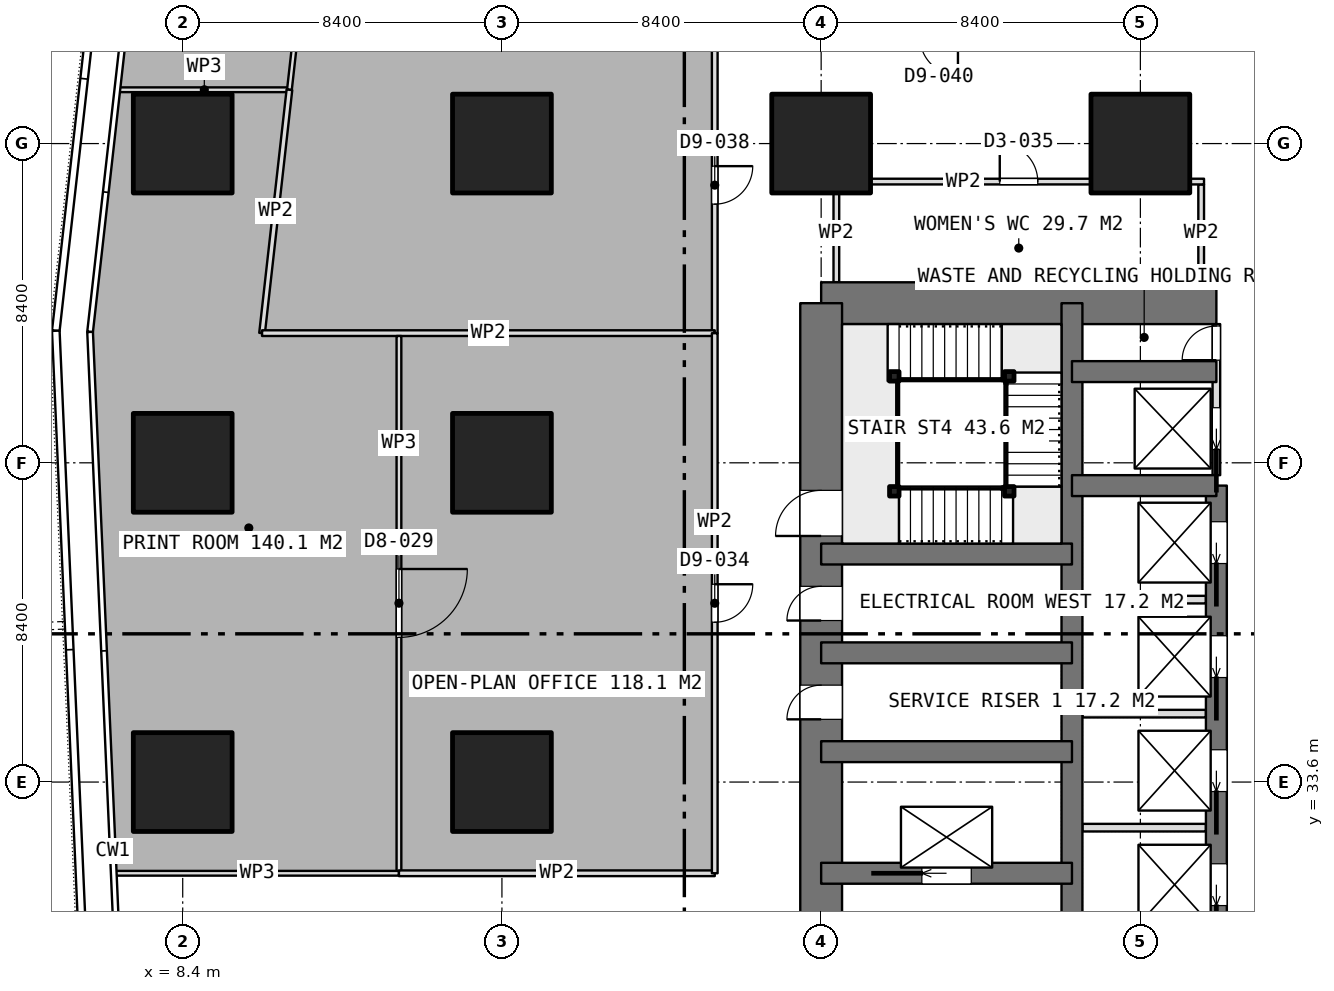
"""IFC4 building model, lengths in metres.
Left out: names, types, materials, properties, quantities, classifications, styles, units other than length and angle.
Written with IfcOpenShell. Run it as: python <this file> out.ifc"""

import sys

from ifc_helpers import new_model, si_unit, direction, frame, frame_2d, origin, origin_2d, place, context, subcontext, project, spatial, rectangle, extrude, element, fill, save


model = new_model("IFC4")
c1 = context("Model", 3, precision=1e-05, world=origin(), true_north=direction((0.0, 1.0)))
c2 = subcontext(c1, "Body", "Model", "MODEL_VIEW")
j1 = project(units=[si_unit("LENGTHUNIT", "METRE"), si_unit("PLANEANGLEUNIT", "RADIAN")], contexts=[c1])
p1 = place(None, origin())
s1 = spatial("IfcSite", under=j1, at=p1, CompositionType="ELEMENT")
p2 = place(p1, origin())
s2 = spatial("IfcBuilding", under=s1, at=p2, CompositionType="ELEMENT")
p3 = place(p2, frame((0.0, 0.0, 29.15)))
s3 = spatial("IfcBuildingStorey", under=s2, at=p3, CompositionType="ELEMENT", Elevation=29.15)
p4 = place(p3, frame((25.2, 46.2, 0.0), z_axis=(0.0, 0.0, 1.0), x_axis=(1.0, 0.0, 0.0)))
e1 = element("IfcWall", 1, at=p4, inside=s3, PredefinedType="SHEAR", context=c2, shape_type="SweptSolid", body=[
    extrude(rectangle(XDim=10.4, YDim=1.1, at=frame_2d((5.2, 0.0))), origin(), (0.0, 0.0, 1.0), 3.75),
])
p5 = place(p3, frame((25.2, 21.0, 0.0), z_axis=(0.0, 0.0, 1.0), x_axis=(0.0, 1.0, 0.0)))
e2 = element("IfcWall", 2, at=p5, inside=s3, PredefinedType="SHEAR", context=c2, shape_type="SweptSolid", body=[
    extrude(rectangle(XDim=25.2, YDim=1.1, at=frame_2d((12.6, 0.0))), origin(), (0.0, 0.0, 1.0), 3.75),
])
p6 = place(p5, frame((7.8, 0.0, 0.0)))
e3 = element("IfcOpeningElement", 3, at=p6, cuts=e2, PredefinedType="OPENING", context=c2, shape_type="SweptSolid", body=[
    extrude(rectangle(XDim=1.2, YDim=2.1, at=frame_2d((0.6, 1.05))), frame((0.0, 0.56, 0.0), z_axis=(0.0, -1.0, 0.0), x_axis=(1.0, 0.0, 0.0)), (0.0, 0.0, 1.0), 1.12),
])
p7 = place(p5, frame((14.25, 0.0, 0.0)))
e4 = element("IfcOpeningElement", 4, at=p7, cuts=e2, PredefinedType="OPENING", context=c2, shape_type="SweptSolid", body=[
    extrude(rectangle(XDim=0.9, YDim=2.1, at=frame_2d((0.45, 1.05))), frame((0.0, 0.56, 0.0), z_axis=(0.0, -1.0, 0.0), x_axis=(1.0, 0.0, 0.0)), (0.0, 0.0, 1.0), 1.12),
])
p8 = place(p5, frame((16.85, 0.0, 0.0)))
e5 = element("IfcOpeningElement", 5, at=p8, cuts=e2, PredefinedType="OPENING", context=c2, shape_type="SweptSolid", body=[
    extrude(rectangle(XDim=0.9, YDim=2.1, at=frame_2d((0.45, 1.05))), frame((0.0, 0.56, 0.0), z_axis=(0.0, -1.0, 0.0), x_axis=(1.0, 0.0, 0.0)), (0.0, 0.0, 1.0), 1.12),
])
p9 = place(p5, frame((19.075, 0.0, 0.0)))
e6 = element("IfcOpeningElement", 6, at=p9, cuts=e2, PredefinedType="OPENING", context=c2, shape_type="SweptSolid", body=[
    extrude(rectangle(XDim=1.2, YDim=2.1, at=frame_2d((0.6, 1.05))), frame((0.0, 0.56, 0.0), z_axis=(0.0, -1.0, 0.0), x_axis=(1.0, 0.0, 0.0)), (0.0, 0.0, 1.0), 1.12),
])
p10 = place(p3, frame((31.8, 21.0, 0.0), z_axis=(0.0, 0.0, 1.0), x_axis=(0.0, 1.0, 0.0)))
e7 = element("IfcWall", 7, at=p10, inside=s3, PredefinedType="SHEAR", context=c2, shape_type="SweptSolid", body=[
    extrude(rectangle(XDim=25.2, YDim=0.55, at=frame_2d((12.6, 0.0))), origin(), (0.0, 0.0, 1.0), 3.75),
])
p11 = place(p3, frame((35.6, 23.4, 0.0), z_axis=(0.0, 0.0, 1.0), x_axis=(0.0, 1.0, 0.0)))
e8 = element("IfcWall", 8, at=p11, inside=s3, PredefinedType="SHEAR", context=c2, shape_type="SweptSolid", body=[
    extrude(rectangle(XDim=18.0, YDim=0.55, at=frame_2d((9.0, 0.0))), origin(), (0.0, 0.0, 1.0), 3.75),
])
p12 = place(p11, frame((0.95, 0.0, 0.0)))
e9 = element("IfcOpeningElement", 9, at=p12, cuts=e8, PredefinedType="OPENING", context=c2, shape_type="SweptSolid", body=[
    extrude(rectangle(XDim=1.1, YDim=2.1, at=frame_2d((0.55, 1.05))), frame((0.0, 0.285, 0.0), z_axis=(0.0, -1.0, 0.0), x_axis=(1.0, 0.0, 0.0)), (0.0, 0.0, 1.0), 0.57),
])
p13 = place(p11, frame((3.95, 0.0, 0.0)))
e10 = element("IfcOpeningElement", 10, at=p13, cuts=e8, PredefinedType="OPENING", context=c2, shape_type="SweptSolid", body=[
    extrude(rectangle(XDim=1.1, YDim=2.1, at=frame_2d((0.55, 1.05))), frame((0.0, 0.285, 0.0), z_axis=(0.0, -1.0, 0.0), x_axis=(1.0, 0.0, 0.0)), (0.0, 0.0, 1.0), 0.57),
])
p14 = place(p11, frame((6.95, 0.0, 0.0)))
e11 = element("IfcOpeningElement", 11, at=p14, cuts=e8, PredefinedType="OPENING", context=c2, shape_type="SweptSolid", body=[
    extrude(rectangle(XDim=1.1, YDim=2.1, at=frame_2d((0.55, 1.05))), frame((0.0, 0.285, 0.0), z_axis=(0.0, -1.0, 0.0), x_axis=(1.0, 0.0, 0.0)), (0.0, 0.0, 1.0), 0.57),
])
p15 = place(p11, frame((9.95, 0.0, 0.0)))
e12 = element("IfcOpeningElement", 12, at=p15, cuts=e8, PredefinedType="OPENING", context=c2, shape_type="SweptSolid", body=[
    extrude(rectangle(XDim=1.1, YDim=2.1, at=frame_2d((0.55, 1.05))), frame((0.0, 0.285, 0.0), z_axis=(0.0, -1.0, 0.0), x_axis=(1.0, 0.0, 0.0)), (0.0, 0.0, 1.0), 0.57),
])
p16 = place(p11, frame((12.95, 0.0, 0.0)))
e13 = element("IfcOpeningElement", 13, at=p16, cuts=e8, PredefinedType="OPENING", context=c2, shape_type="SweptSolid", body=[
    extrude(rectangle(XDim=1.1, YDim=2.1, at=frame_2d((0.55, 1.05))), frame((0.0, 0.285, 0.0), z_axis=(0.0, -1.0, 0.0), x_axis=(1.0, 0.0, 0.0)), (0.0, 0.0, 1.0), 0.57),
])
p17 = place(p11, frame((15.95, 0.0, 0.0)))
e14 = element("IfcOpeningElement", 14, at=p17, cuts=e8, PredefinedType="OPENING", context=c2, shape_type="SweptSolid", body=[
    extrude(rectangle(XDim=1.1, YDim=2.1, at=frame_2d((0.55, 1.05))), frame((0.0, 0.285, 0.0), z_axis=(0.0, -1.0, 0.0), x_axis=(1.0, 0.0, 0.0)), (0.0, 0.0, 1.0), 0.57),
])
for number, where, z_axis, x_axis in (
    (15, (31.8, 41.4, 0.0), (0.0, 0.0, 1.0), (1.0, 0.0, 0.0)),
    (16, (31.8, 44.4, 0.0), (0.0, 0.0, 1.0), (1.0, 0.0, 0.0)),
):
    element("IfcWall", number, at=place(p3, frame(where, z_axis=z_axis, x_axis=x_axis)), inside=s3, PredefinedType="SHEAR", context=c2, shape_type="SweptSolid", body=[
        extrude(rectangle(XDim=3.8, YDim=0.55, at=frame_2d((1.9, 0.0))), origin(), (0.0, 0.0, 1.0), 3.75),
    ])
p18 = place(p3, frame((25.2, 31.2, 0.0), z_axis=(0.0, 0.0, 1.0), x_axis=(1.0, 0.0, 0.0)))
e17 = element("IfcWall", 17, at=p18, inside=s3, PredefinedType="SHEAR", context=c2, shape_type="SweptSolid", body=[
    extrude(rectangle(XDim=6.6, YDim=0.55, at=frame_2d((3.3, 0.0))), origin(), (0.0, 0.0, 1.0), 3.75),
])
p19 = place(p18, frame((2.65, 0.0, 0.0)))
e18 = element("IfcOpeningElement", 18, at=p19, cuts=e17, PredefinedType="OPENING", context=c2, shape_type="SweptSolid", body=[
    extrude(rectangle(XDim=1.3, YDim=2.1, at=frame_2d((0.65, 1.05))), frame((0.0, 0.285, 0.0), z_axis=(0.0, -1.0, 0.0), x_axis=(1.0, 0.0, 0.0)), (0.0, 0.0, 1.0), 0.57),
])
for number, where, z_axis, x_axis in (
    (19, (25.2, 34.4, 0.0), (0.0, 0.0, 1.0), (1.0, 0.0, 0.0)),
    (20, (25.2, 37.0, 0.0), (0.0, 0.0, 1.0), (1.0, 0.0, 0.0)),
    (21, (25.2, 39.6, 0.0), (0.0, 0.0, 1.0), (1.0, 0.0, 0.0)),
):
    element("IfcWall", number, at=place(p3, frame(where, z_axis=z_axis, x_axis=x_axis)), inside=s3, PredefinedType="SHEAR", context=c2, shape_type="SweptSolid", body=[
        extrude(rectangle(XDim=6.6, YDim=0.55, at=frame_2d((3.3, 0.0))), origin(), (0.0, 0.0, 1.0), 3.75),
    ])
for number, where, z_axis, x_axis in (
    (22, (8.4, 33.6, 0.0), (0.0, 0.0, 1.0), (1.0, 0.0, 0.0)),
    (23, (8.4, 42.0, 0.0), (0.0, 0.0, 1.0), (1.0, 0.0, 0.0)),
    (24, (8.4, 50.4, 0.0), (0.0, 0.0, 1.0), (1.0, 0.0, 0.0)),
    (25, (16.8, 33.6, 0.0), (0.0, 0.0, 1.0), (1.0, 0.0, 0.0)),
    (26, (16.8, 42.0, 0.0), (0.0, 0.0, 1.0), (1.0, 0.0, 0.0)),
    (27, (16.8, 50.4, 0.0), (0.0, 0.0, 1.0), (1.0, 0.0, 0.0)),
    (28, (25.2, 50.4, 0.0), (0.0, 0.0, 1.0), (1.0, 0.0, 0.0)),
    (29, (33.6, 50.4, 0.0), (0.0, 0.0, 1.0), (1.0, 0.0, 0.0)),
):
    element("IfcColumn", number, at=place(p3, frame(where, z_axis=z_axis, x_axis=x_axis)), inside=s3, PredefinedType="COLUMN", context=c2, shape_type="SweptSolid", body=[
        extrude(rectangle(XDim=2.6, YDim=2.6, at=origin_2d()), origin(), (0.0, 0.0, 1.0), 3.75),
    ])
for number, where, z_axis, x_axis in (
    (30, (32.075, 32.4, 0.0), (0.0, 0.0, 1.0), (1.0, 0.0, 0.0)),
    (31, (32.075, 35.4, 0.0), (0.0, 0.0, 1.0), (1.0, 0.0, 0.0)),
    (32, (32.075, 38.4, 0.0), (0.0, 0.0, 1.0), (1.0, 0.0, 0.0)),
):
    element("IfcWall", number, at=place(p3, frame(where, z_axis=z_axis, x_axis=x_axis)), inside=s3, PredefinedType="PARTITIONING", context=c2, shape_type="SweptSolid", body=[
        extrude(rectangle(XDim=3.25, YDim=0.2, at=frame_2d((1.625, 0.0))), origin(), (0.0, 0.0, 1.0), 3.5),
    ])
p20 = place(p3, frame((35.6, 41.675, 0.0), z_axis=(0.0, 0.0, 1.0), x_axis=(0.0, 1.0, 0.0)))
e33 = element("IfcWall", 33, at=p20, inside=s3, PredefinedType="PARTITIONING", context=c2, shape_type="SweptSolid", body=[
    extrude(rectangle(XDim=3.975, YDim=0.2, at=frame_2d((1.987, 0.0))), origin(), (0.0, 0.0, 1.0), 3.5),
])
p21 = place(p20, frame((3.025, 0.0, 0.0)))
e34 = element("IfcOpeningElement", 34, at=p21, cuts=e33, PredefinedType="OPENING", context=c2, shape_type="SweptSolid", body=[
    extrude(rectangle(XDim=0.9, YDim=2.1, at=frame_2d((0.45, 1.05))), frame((0.0, 0.11, 0.0), z_axis=(0.0, -1.0, 0.0), x_axis=(1.0, 0.0, 0.0)), (0.0, 0.0, 1.0), 0.22),
])
p22 = place(p20, frame((0.675, 0.0, 0.0)))
e35 = element("IfcOpeningElement", 35, at=p22, cuts=e33, PredefinedType="OPENING", context=c2, shape_type="SweptSolid", body=[
    extrude(rectangle(XDim=1.1, YDim=2.1, at=frame_2d((0.55, 1.05))), frame((0.0, 0.11, 0.0), z_axis=(0.0, -1.0, 0.0), x_axis=(1.0, 0.0, 0.0)), (0.0, 0.0, 1.0), 0.22),
])
p23 = place(p3, frame((25.525, 49.4, 0.0), z_axis=(0.0, 0.0, 1.0), x_axis=(1.0, 0.0, 0.0)))
e36 = element("IfcWall", 36, at=p23, inside=s3, PredefinedType="PARTITIONING", context=c2, shape_type="SweptSolid", body=[
    extrude(rectangle(XDim=9.75, YDim=0.15, at=frame_2d((4.875, 0.0))), origin(), (0.0, 0.0, 1.0), 3.5),
])
p24 = place(p23, frame((4.375, 0.0, 0.0)))
e37 = element("IfcOpeningElement", 37, at=p24, cuts=e36, PredefinedType="OPENING", context=c2, shape_type="SweptSolid", body=[
    extrude(rectangle(XDim=1.0, YDim=2.1, at=frame_2d((0.5, 1.05))), frame((0.0, 0.085, 0.0), z_axis=(0.0, -1.0, 0.0), x_axis=(1.0, 0.0, 0.0)), (0.0, 0.0, 1.0), 0.17),
])
for number, where, z_axis, x_axis in (
    (38, (25.6, 46.75, 0.0), (0.0, 0.0, 1.0), (0.0, 1.0, 0.0)),
    (39, (35.2, 46.75, 0.0), (0.0, 0.0, 1.0), (0.0, 1.0, 0.0)),
):
    element("IfcWall", number, at=place(p3, frame(where, z_axis=z_axis, x_axis=x_axis)), inside=s3, PredefinedType="PARTITIONING", context=c2, shape_type="SweptSolid", body=[
        extrude(rectangle(XDim=2.575, YDim=0.15, at=frame_2d((1.288, 0.0))), origin(), (0.0, 0.0, 1.0), 3.5),
    ])
p25 = place(p3, frame((11.208, 51.816, 0.0), z_axis=(0.0, 0.0, 1.0), x_axis=(-1.0, 0.0, 0.0)))
e40 = element("IfcWall", 40, at=p25, inside=s3, PredefinedType="PARTITIONING", context=c2, shape_type="SweptSolid", body=[
    extrude(rectangle(XDim=4.479, YDim=0.125, at=frame_2d((2.24, 0.0))), origin(), (0.0, 0.0, 1.0), 3.5),
])
p26 = place(p3, frame((11.72, 56.371, 0.0), z_axis=(0.0, 0.0, 1.0), x_axis=(-0.11168826691, -0.993743292322, 0.0)))
e41 = element("IfcWall", 41, at=p26, inside=s3, PredefinedType="PARTITIONING", context=c2, shape_type="SweptSolid", body=[
    extrude(rectangle(XDim=4.584, YDim=0.125, at=frame_2d((2.292, 0.0))), origin(), (0.0, 0.0, 1.0), 3.5),
])
p27 = place(p3, frame((10.488, 45.412, 0.0), z_axis=(0.0, 0.0, 1.0), x_axis=(0.111741452635, 0.993737313259, 0.0)))
e42 = element("IfcWall", 42, at=p27, inside=s3, PredefinedType="PARTITIONING", context=c2, shape_type="SweptSolid", body=[
    extrude(rectangle(XDim=6.443, YDim=0.15, at=frame_2d((3.222, 0.0))), origin(), (0.0, 0.0, 1.0), 3.5),
])
p28 = place(p3, frame((22.4, 53.2, 0.0), z_axis=(0.0, 0.0, 1.0), x_axis=(0.0, -1.0, 0.0)))
e43 = element("IfcWall", 43, at=p28, inside=s3, PredefinedType="PARTITIONING", context=c2, shape_type="SweptSolid", body=[
    extrude(rectangle(XDim=7.788, YDim=0.15, at=frame_2d((3.894, 0.0))), origin(), (0.0, 0.0, 1.0), 3.5),
])
p29 = place(p28, frame((3.394, 0.0, 0.0)))
e44 = element("IfcOpeningElement", 44, at=p29, cuts=e43, PredefinedType="OPENING", context=c2, shape_type="SweptSolid", body=[
    extrude(rectangle(XDim=1.0, YDim=2.1, at=frame_2d((0.5, 1.05))), frame((0.0, 0.085, 0.0), z_axis=(0.0, -1.0, 0.0), x_axis=(1.0, 0.0, 0.0)), (0.0, 0.0, 1.0), 0.17),
])
p30 = place(p3, frame((22.4, 45.412, 0.0), z_axis=(0.0, 0.0, 1.0), x_axis=(-1.0, 0.0, 0.0)))
e45 = element("IfcWall", 45, at=p30, inside=s3, PredefinedType="PARTITIONING", context=c2, shape_type="SweptSolid", body=[
    extrude(rectangle(XDim=11.912, YDim=0.15, at=frame_2d((5.956, 0.0))), origin(), (0.0, 0.0, 1.0), 3.5),
])
p31 = place(p3, frame((14.09, 45.337, 0.0), z_axis=(0.0, 0.0, 1.0), x_axis=(0.0, -1.0, 0.0)))
e46 = element("IfcWall", 46, at=p31, inside=s3, PredefinedType="PARTITIONING", context=c2, shape_type="SweptSolid", body=[
    extrude(rectangle(XDim=14.137, YDim=0.125, at=frame_2d((7.068, 0.0))), origin(), (0.0, 0.0, 1.0), 3.5),
])
p32 = place(p31, frame((6.131, 0.0, 0.0)))
e47 = element("IfcOpeningElement", 47, at=p32, cuts=e46, PredefinedType="OPENING", context=c2, shape_type="SweptSolid", body=[
    extrude(rectangle(XDim=1.8, YDim=2.1, at=frame_2d((0.9, 1.05))), frame((0.0, 0.073, 0.0), z_axis=(0.0, -1.0, 0.0), x_axis=(1.0, 0.0, 0.0)), (0.0, 0.0, 1.0), 0.145),
])
p33 = place(p3, frame((14.09, 31.2, 0.0), z_axis=(0.0, 0.0, 1.0), x_axis=(-1.0, 0.0, 0.0)))
e48 = element("IfcWall", 48, at=p33, inside=s3, PredefinedType="PARTITIONING", context=c2, shape_type="SweptSolid", body=[
    extrude(rectangle(XDim=7.455, YDim=0.125, at=frame_2d((3.728, 0.0))), origin(), (0.0, 0.0, 1.0), 3.5),
])
p34 = place(p3, frame((22.4, 31.2, 0.0), z_axis=(0.0, 0.0, 1.0), x_axis=(-1.0, 0.0, 0.0)))
e49 = element("IfcWall", 49, at=p34, inside=s3, PredefinedType="PARTITIONING", context=c2, shape_type="SweptSolid", body=[
    extrude(rectangle(XDim=8.31, YDim=0.15, at=frame_2d((4.155, 0.0))), origin(), (0.0, 0.0, 1.0), 3.5),
])
p35 = place(p3, frame((22.4, 45.411, 0.0), z_axis=(0.0, 0.0, 1.0), x_axis=(0.0, -1.0, 0.0)))
e50 = element("IfcWall", 50, at=p35, inside=s3, PredefinedType="PARTITIONING", context=c2, shape_type="SweptSolid", body=[
    extrude(rectangle(XDim=14.211, YDim=0.15, at=frame_2d((7.105, 0.0))), origin(), (0.0, 0.0, 1.0), 3.5),
])
p36 = place(p35, frame((6.606, 0.0, 0.0)))
e51 = element("IfcOpeningElement", 51, at=p36, cuts=e50, PredefinedType="OPENING", context=c2, shape_type="SweptSolid", body=[
    extrude(rectangle(XDim=1.0, YDim=2.1, at=frame_2d((0.5, 1.05))), frame((0.0, 0.085, 0.0), z_axis=(0.0, -1.0, 0.0), x_axis=(1.0, 0.0, 0.0)), (0.0, 0.0, 1.0), 0.17),
])
for number, where, z_axis, x_axis in (
    (52, (27.125, 41.25, 0.0), (0.0, 0.0, 1.0), (1.0, 0.0, 0.0)),
    (53, (30.15, 41.25, 0.0), (0.0, 0.0, 1.0), (1.0, 0.0, 0.0)),
    (54, (30.15, 44.275, 0.0), (0.0, 0.0, 1.0), (1.0, 0.0, 0.0)),
    (55, (27.125, 44.275, 0.0), (0.0, 0.0, 1.0), (1.0, 0.0, 0.0)),
):
    element("IfcColumn", number, at=place(p3, frame(where, z_axis=z_axis, x_axis=x_axis)), inside=s3, PredefinedType="COLUMN", context=c2, shape_type="SweptSolid", body=[
        extrude(rectangle(XDim=0.25, YDim=0.25, at=origin_2d()), origin(), (0.0, 0.0, 1.0), 3.75),
    ])
p37 = place(p7, origin())
e56 = element("IfcDoor", 56, at=p37, inside=s3, OperationType="SINGLE_SWING_LEFT", PredefinedType="DOOR", context=c2, shape_type="SweptSolid", body=[
    extrude(rectangle(XDim=0.9, YDim=2.1, at=frame_2d((0.45, 1.05))), frame((0.0, 0.025, 0.0), z_axis=(0.0, -1.0, 0.0), x_axis=(1.0, 0.0, 0.0)), (0.0, 0.0, 1.0), 0.05),
])
fill(e4, e56)
p38 = place(p8, origin())
e57 = element("IfcDoor", 57, at=p38, inside=s3, OperationType="SINGLE_SWING_LEFT", PredefinedType="DOOR", context=c2, shape_type="SweptSolid", body=[
    extrude(rectangle(XDim=0.9, YDim=2.1, at=frame_2d((0.45, 1.05))), frame((0.0, 0.025, 0.0), z_axis=(0.0, -1.0, 0.0), x_axis=(1.0, 0.0, 0.0)), (0.0, 0.0, 1.0), 0.05),
])
fill(e5, e57)
p39 = place(p21, origin())
e58 = element("IfcDoor", 58, at=p39, inside=s3, OperationType="SINGLE_SWING_LEFT", PredefinedType="DOOR", context=c2, shape_type="SweptSolid", body=[
    extrude(rectangle(XDim=0.9, YDim=2.1, at=frame_2d((0.45, 1.05))), frame((0.0, 0.025, 0.0), z_axis=(0.0, -1.0, 0.0), x_axis=(1.0, 0.0, 0.0)), (0.0, 0.0, 1.0), 0.05),
])
fill(e34, e58)
p40 = place(p14, origin())
e59 = element("IfcDoor", 59, at=p40, inside=s3, OperationType="SLIDING_TO_LEFT", PredefinedType="USERDEFINED", context=c2, shape_type="SweptSolid", body=[
    extrude(rectangle(XDim=1.1, YDim=2.1, at=frame_2d((0.55, 1.05))), frame((0.0, 0.025, 0.0), z_axis=(0.0, -1.0, 0.0), x_axis=(1.0, 0.0, 0.0)), (0.0, 0.0, 1.0), 0.05),
])
fill(e11, e59)
p41 = place(p15, origin())
e60 = element("IfcDoor", 60, at=p41, inside=s3, OperationType="SLIDING_TO_LEFT", PredefinedType="USERDEFINED", context=c2, shape_type="SweptSolid", body=[
    extrude(rectangle(XDim=1.1, YDim=2.1, at=frame_2d((0.55, 1.05))), frame((0.0, 0.025, 0.0), z_axis=(0.0, -1.0, 0.0), x_axis=(1.0, 0.0, 0.0)), (0.0, 0.0, 1.0), 0.05),
])
fill(e12, e60)
p42 = place(p16, origin())
e61 = element("IfcDoor", 61, at=p42, inside=s3, OperationType="SLIDING_TO_LEFT", PredefinedType="USERDEFINED", context=c2, shape_type="SweptSolid", body=[
    extrude(rectangle(XDim=1.1, YDim=2.1, at=frame_2d((0.55, 1.05))), frame((0.0, 0.025, 0.0), z_axis=(0.0, -1.0, 0.0), x_axis=(1.0, 0.0, 0.0)), (0.0, 0.0, 1.0), 0.05),
])
fill(e13, e61)
p43 = place(p17, origin())
e62 = element("IfcDoor", 62, at=p43, inside=s3, OperationType="SLIDING_TO_LEFT", PredefinedType="USERDEFINED", context=c2, shape_type="SweptSolid", body=[
    extrude(rectangle(XDim=1.1, YDim=2.1, at=frame_2d((0.55, 1.05))), frame((0.0, 0.025, 0.0), z_axis=(0.0, -1.0, 0.0), x_axis=(1.0, 0.0, 0.0)), (0.0, 0.0, 1.0), 0.05),
])
fill(e14, e62)
p44 = place(p19, origin())
e63 = element("IfcDoor", 63, at=p44, inside=s3, OperationType="SLIDING_TO_LEFT", PredefinedType="USERDEFINED", context=c2, shape_type="SweptSolid", body=[
    extrude(rectangle(XDim=1.3, YDim=2.1, at=frame_2d((0.65, 1.05))), frame((0.0, 0.025, 0.0), z_axis=(0.0, -1.0, 0.0), x_axis=(1.0, 0.0, 0.0)), (0.0, 0.0, 1.0), 0.05),
])
fill(e18, e63)
p45 = place(p22, origin())
e64 = element("IfcDoor", 64, at=p45, inside=s3, OperationType="SLIDING_TO_LEFT", PredefinedType="USERDEFINED", context=c2, shape_type="SweptSolid", body=[
    extrude(rectangle(XDim=1.1, YDim=2.1, at=frame_2d((0.55, 1.05))), frame((0.0, 0.025, 0.0), z_axis=(0.0, -1.0, 0.0), x_axis=(1.0, 0.0, 0.0)), (0.0, 0.0, 1.0), 0.05),
])
fill(e35, e64)
p46 = place(p24, origin())
e65 = element("IfcDoor", 65, at=p46, inside=s3, OperationType="SINGLE_SWING_LEFT", PredefinedType="DOOR", context=c2, shape_type="SweptSolid", body=[
    extrude(rectangle(XDim=1.0, YDim=2.1, at=frame_2d((0.5, 1.05))), frame((0.0, 0.025, 0.0), z_axis=(0.0, -1.0, 0.0), x_axis=(1.0, 0.0, 0.0)), (0.0, 0.0, 1.0), 0.05),
])
fill(e37, e65)
p47 = place(p29, origin())
e66 = element("IfcDoor", 66, at=p47, inside=s3, OperationType="SINGLE_SWING_LEFT", PredefinedType="DOOR", context=c2, shape_type="SweptSolid", body=[
    extrude(rectangle(XDim=1.0, YDim=2.1, at=frame_2d((0.5, 1.05))), frame((0.0, 0.025, 0.0), z_axis=(0.0, -1.0, 0.0), x_axis=(1.0, 0.0, 0.0)), (0.0, 0.0, 1.0), 0.05),
])
fill(e44, e66)
p48 = place(p32, origin())
e67 = element("IfcDoor", 67, at=p48, inside=s3, OperationType="DOUBLE_DOOR_SINGLE_SWING", PredefinedType="DOOR", context=c2, shape_type="SweptSolid", body=[
    extrude(rectangle(XDim=1.8, YDim=2.1, at=frame_2d((0.9, 1.05))), frame((0.0, 0.025, 0.0), z_axis=(0.0, -1.0, 0.0), x_axis=(1.0, 0.0, 0.0)), (0.0, 0.0, 1.0), 0.05),
])
fill(e47, e67)
p49 = place(p36, origin())
e68 = element("IfcDoor", 68, at=p49, inside=s3, OperationType="SINGLE_SWING_LEFT", PredefinedType="DOOR", context=c2, shape_type="SweptSolid", body=[
    extrude(rectangle(XDim=1.0, YDim=2.1, at=frame_2d((0.5, 1.05))), frame((0.0, 0.025, 0.0), z_axis=(0.0, -1.0, 0.0), x_axis=(1.0, 0.0, 0.0)), (0.0, 0.0, 1.0), 0.05),
])
fill(e51, e68)
p50 = place(p9, origin())
e69 = element("IfcDoor", 69, at=p50, inside=s3, OperationType="SINGLE_SWING_RIGHT", PredefinedType="DOOR", context=c2, shape_type="SweptSolid", body=[
    extrude(rectangle(XDim=1.2, YDim=2.1, at=frame_2d((0.6, 1.05))), frame((0.0, 0.025, 0.0), z_axis=(0.0, -1.0, 0.0), x_axis=(1.0, 0.0, 0.0)), (0.0, 0.0, 1.0), 0.05),
])
fill(e6, e69)
save(model, sys.argv[1])
